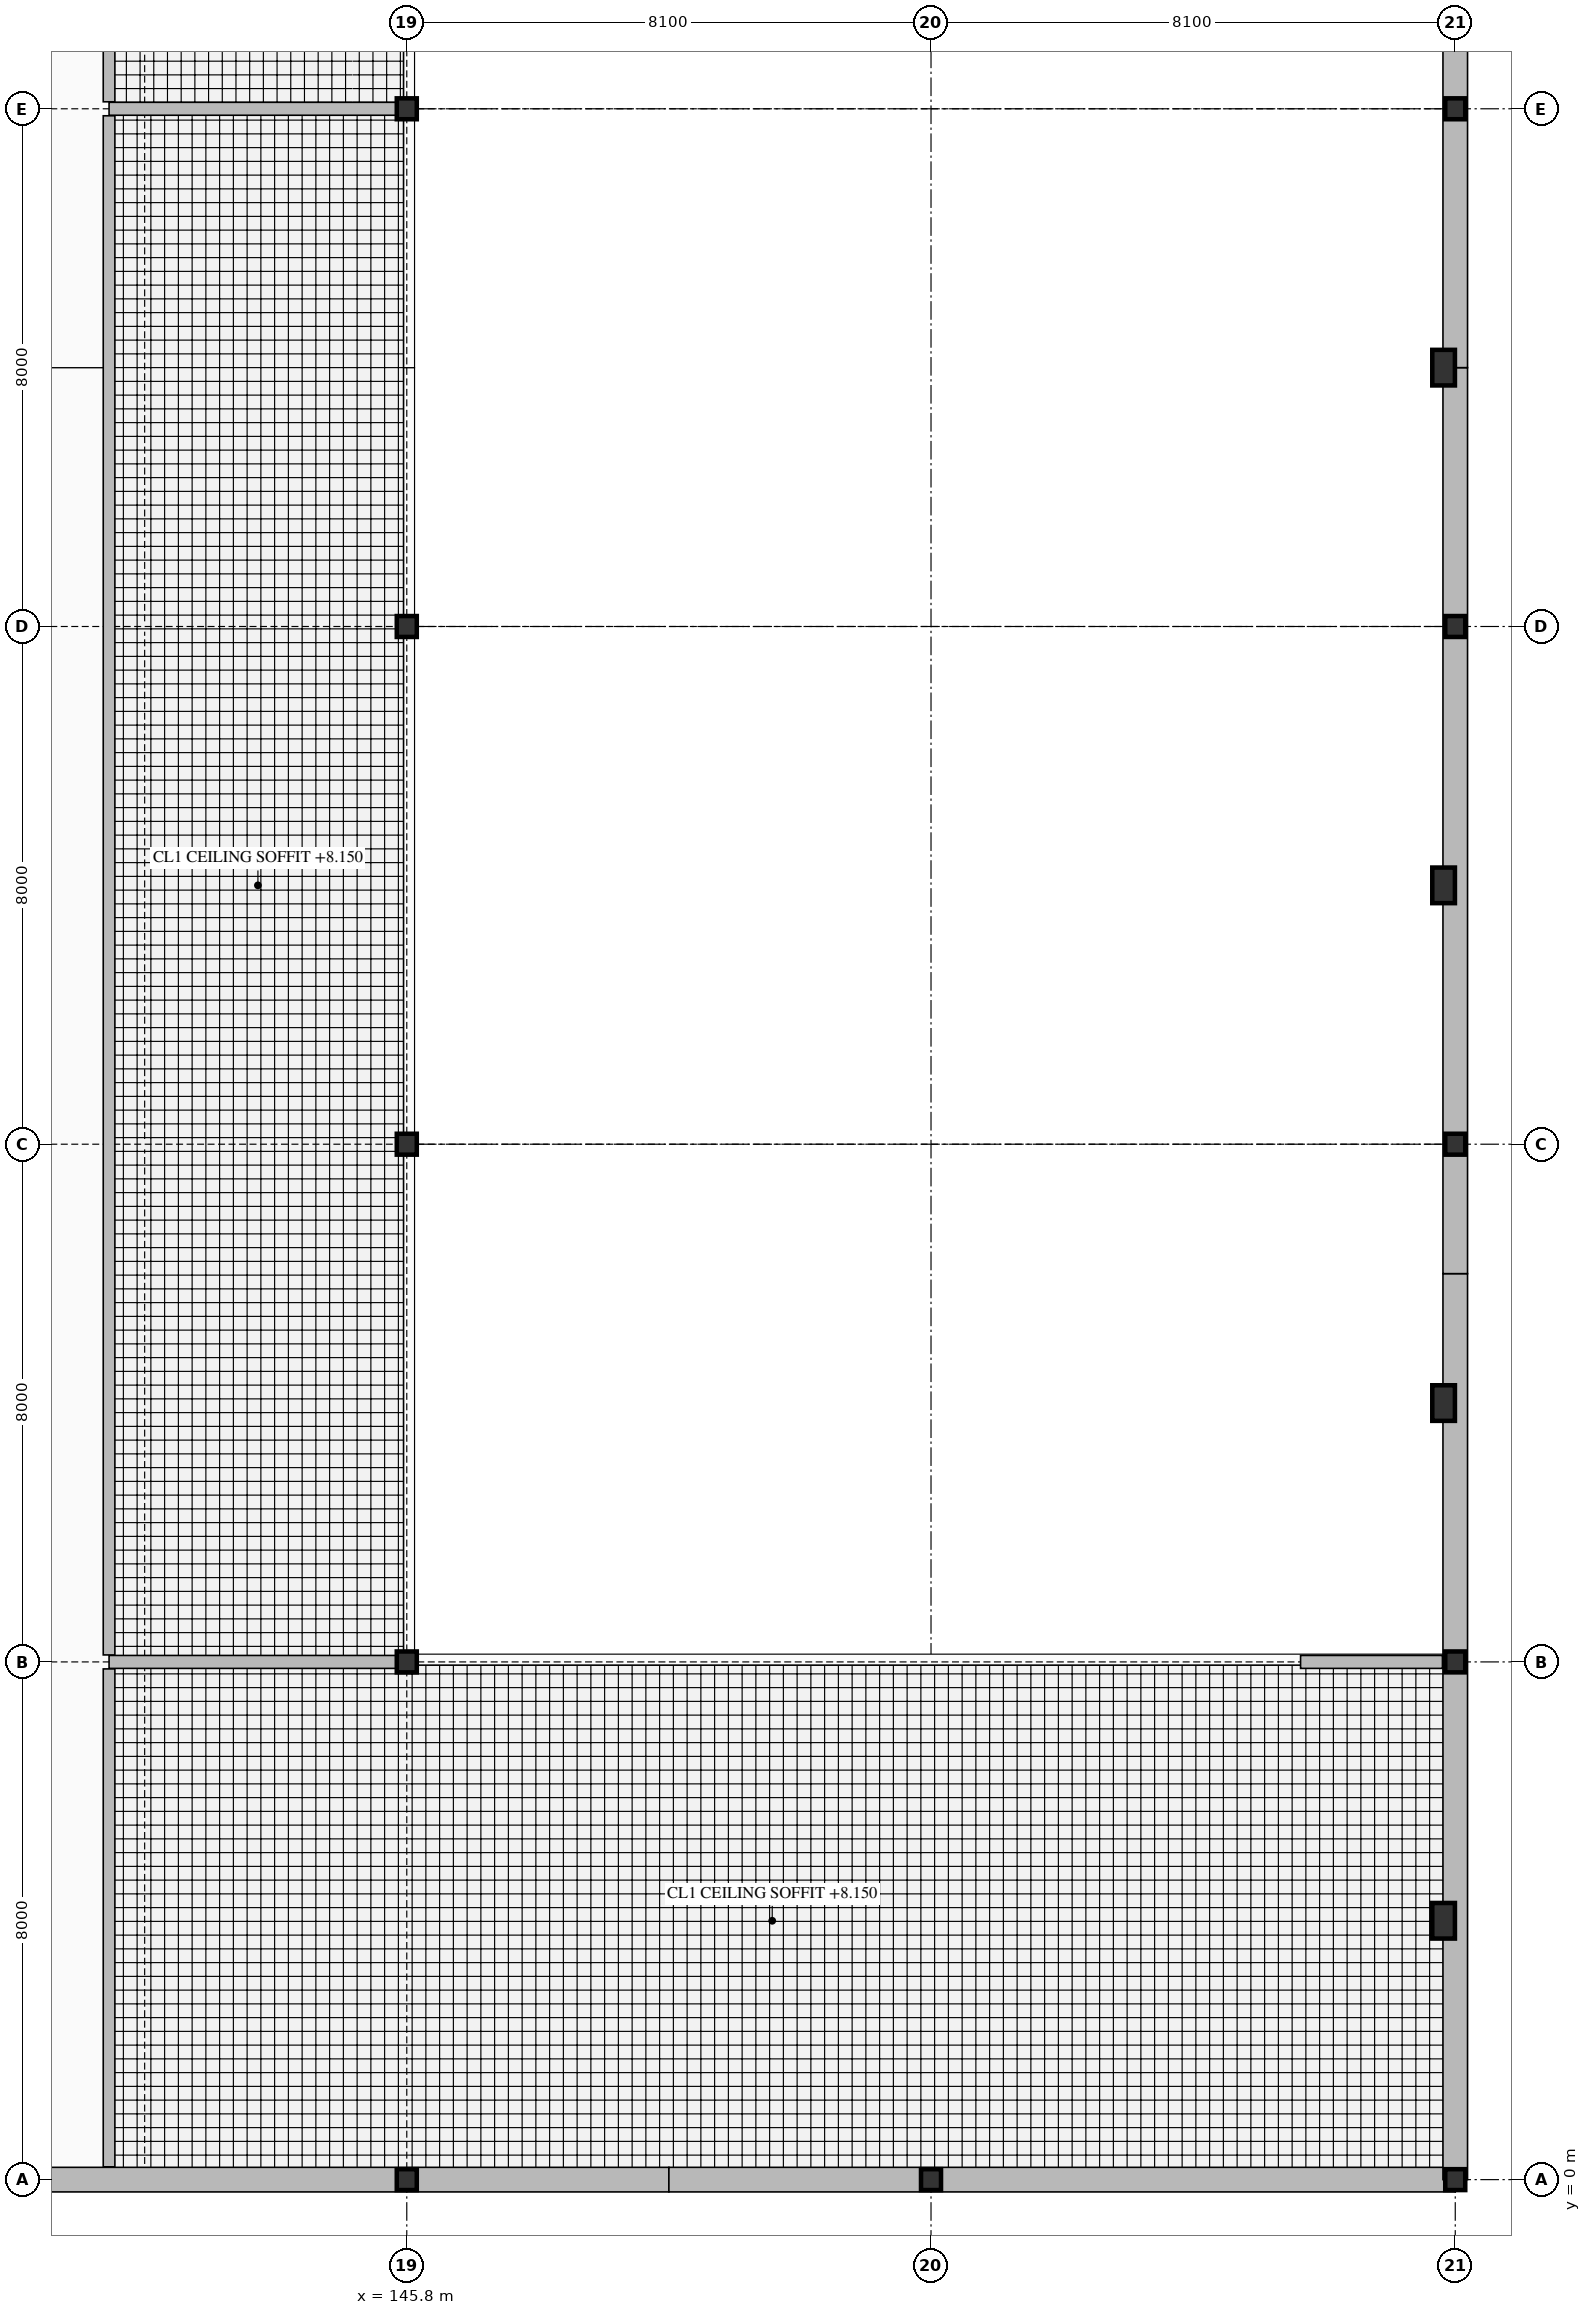
"""IFC4 building model, lengths in metres.
Left out: names, types, materials, properties, quantities, classifications, styles, units other than length and angle.
Written with IfcOpenShell. Run it as: python <this file> out.ifc"""

import sys

from ifc_helpers import new_model, si_unit, direction, frame, frame_2d, origin, origin_2d, place, context, subcontext, project, spatial, rectangle, i_section, extrude, element, fill, save


model = new_model("IFC4")
c1 = context("Model", 3, precision=1e-05, world=origin(), true_north=direction((0.0, 1.0)))
c2 = subcontext(c1, "Body", "Model", "MODEL_VIEW")
j1 = project(units=[si_unit("LENGTHUNIT", "METRE"), si_unit("PLANEANGLEUNIT", "RADIAN")], contexts=[c1])
p1 = place(None, origin())
s1 = spatial("IfcSite", under=j1, at=p1, CompositionType="ELEMENT")
p2 = place(p1, origin())
s2 = spatial("IfcBuilding", under=s1, at=p2, CompositionType="ELEMENT")
p3 = place(p2, frame((0.0, 0.0, 5.4)))
s3 = spatial("IfcBuildingStorey", under=s2, at=p3, CompositionType="ELEMENT", Elevation=5.4)
for number, where, z_axis, x_axis in (
    (1, (145.8, 0.0, 0.0), (0.0, 0.0, 1.0), (1.0, 0.0, 0.0)),
    (2, (145.8, 8.0, 0.0), (0.0, 0.0, 1.0), (1.0, 0.0, 0.0)),
    (3, (145.8, 16.0, 0.0), (0.0, 0.0, 1.0), (1.0, 0.0, 0.0)),
    (4, (145.8, 24.0, 0.0), (0.0, 0.0, 1.0), (1.0, 0.0, 0.0)),
    (5, (145.8, 32.0, 0.0), (0.0, 0.0, 1.0), (1.0, 0.0, 0.0)),
    (6, (153.9, 0.0, 0.0), (0.0, 0.0, 1.0), (1.0, 0.0, 0.0)),
    (7, (162.0, 0.0, 0.0), (0.0, 0.0, 1.0), (1.0, 0.0, 0.0)),
    (8, (162.0, 8.0, 0.0), (0.0, 0.0, 1.0), (1.0, 0.0, 0.0)),
    (9, (162.0, 16.0, 0.0), (0.0, 0.0, 1.0), (1.0, 0.0, 0.0)),
    (10, (162.0, 24.0, 0.0), (0.0, 0.0, 1.0), (1.0, 0.0, 0.0)),
    (11, (162.0, 32.0, 0.0), (0.0, 0.0, 1.0), (1.0, 0.0, 0.0)),
):
    element("IfcColumn", number, at=place(p3, frame(where, z_axis=z_axis, x_axis=x_axis)), inside=s3, PredefinedType="COLUMN", context=c2, shape_type="SweptSolid", body=[
        extrude(i_section(OverallWidth=0.309, OverallDepth=0.323, WebThickness=0.014, FlangeThickness=0.023, FilletRadius=0.015, at=origin_2d()), origin(), (0.0, 0.0, 1.0), 4.8),
    ])
for number, where, z_axis, x_axis in (
    (12, (161.82, 4.0, 0.0), (0.0, 0.0, 1.0), (1.0, 0.0, 0.0)),
    (13, (161.82, 12.0, 0.0), (0.0, 0.0, 1.0), (1.0, 0.0, 0.0)),
    (14, (161.82, 20.0, 0.0), (0.0, 0.0, 1.0), (1.0, 0.0, 0.0)),
    (15, (161.82, 28.0, 0.0), (0.0, 0.0, 1.0), (1.0, 0.0, 0.0)),
):
    element("IfcColumn", number, at=place(p3, frame(where, z_axis=z_axis, x_axis=x_axis)), inside=s3, PredefinedType="PILASTER", context=c2, shape_type="SweptSolid", body=[
        extrude(rectangle(XDim=0.35, YDim=0.55, at=origin_2d()), origin(), (0.0, 0.0, 1.0), 4.52),
    ])
p4 = place(p3, frame((137.7, 0.0, 0.0), z_axis=(0.0, 0.0, 1.0), x_axis=(1.0, 0.0, 0.0)))
e16 = element("IfcWall", 16, at=p4, inside=s3, PredefinedType="SOLIDWALL", context=c2, shape_type="SweptSolid", body=[
    extrude(rectangle(XDim=12.15, YDim=0.38, at=frame_2d((6.075, 0.0))), origin(), (0.0, 0.0, 1.0), 3.812),
])
p5 = place(p3, frame((149.85, 0.0, 0.0), z_axis=(0.0, 0.0, 1.0), x_axis=(1.0, 0.0, 0.0)))
e17 = element("IfcWall", 17, at=p5, inside=s3, PredefinedType="SOLIDWALL", context=c2, shape_type="SweptSolid", body=[
    extrude(rectangle(XDim=12.15, YDim=0.38, at=frame_2d((6.075, 0.0))), origin(), (0.0, 0.0, 1.0), 3.812),
])
for number, where, z_axis, x_axis in (
    (18, (162.0, 0.0, 0.0), (0.0, 0.0, 1.0), (0.0, 1.0, 0.0)),
    (19, (162.0, 14.0, 0.0), (0.0, 0.0, 1.0), (0.0, 1.0, 0.0)),
    (20, (162.0, 28.0, 0.0), (0.0, 0.0, 1.0), (0.0, 1.0, 0.0)),
):
    element("IfcWall", number, at=place(p3, frame(where, z_axis=z_axis, x_axis=x_axis)), inside=s3, PredefinedType="SOLIDWALL", context=c2, shape_type="SweptSolid", body=[
        extrude(rectangle(XDim=14.0, YDim=0.38, at=frame_2d((7.0, 0.0))), origin(), (0.0, 0.0, 1.0), 3.912),
    ])
for number, where, z_axis, x_axis in (
    (21, (141.2, 8.0, 0.0), (0.0, 0.0, 1.0), (1.0, 0.0, 0.0)),
    (22, (141.2, 32.0, 0.0), (0.0, 0.0, 1.0), (1.0, 0.0, 0.0)),
):
    element("IfcWall", number, at=place(p3, frame(where, z_axis=z_axis, x_axis=x_axis)), inside=s3, PredefinedType="PARTITIONING", context=c2, shape_type="SweptSolid", body=[
        extrude(rectangle(XDim=4.431, YDim=0.2, at=frame_2d((2.215, 0.0))), origin(), (0.0, 0.0, 1.0), 3.812),
    ])
p6 = place(p3, frame((159.61, 8.0, 0.0), z_axis=(0.0, 0.0, 1.0), x_axis=(1.0, 0.0, 0.0)))
e23 = element("IfcWall", 23, at=p6, inside=s3, PredefinedType="PARTITIONING", context=c2, shape_type="SweptSolid", body=[
    extrude(rectangle(XDim=2.192, YDim=0.2, at=frame_2d((1.096, 0.0))), origin(), (0.0, 0.0, 1.0), 3.312),
])
p7 = place(p3, frame((141.2, 0.198, 0.0), z_axis=(0.0, 0.0, 1.0), x_axis=(0.0, 1.0, 0.0)))
e24 = element("IfcWall", 24, at=p7, inside=s3, PredefinedType="PARTITIONING", context=c2, shape_type="SweptSolid", body=[
    extrude(rectangle(XDim=7.694, YDim=0.18, at=frame_2d((3.847, 0.0))), origin(), (0.0, 0.0, 1.0), 4.52),
])
p8 = place(p7, frame((3.297, 0.0, 0.0)))
e25 = element("IfcOpeningElement", 25, at=p8, cuts=e24, PredefinedType="OPENING", context=c2, shape_type="SweptSolid", body=[
    extrude(rectangle(XDim=1.1, YDim=2.2, at=frame_2d((0.55, 1.1))), frame((0.0, 0.1, 0.0), z_axis=(0.0, -1.0, 0.0), x_axis=(1.0, 0.0, 0.0)), (0.0, 0.0, 1.0), 0.2),
])
p9 = place(p3, frame((141.2, 8.108, 0.0), z_axis=(0.0, 0.0, 1.0), x_axis=(0.0, 1.0, 0.0)))
e26 = element("IfcWall", 26, at=p9, inside=s3, PredefinedType="PARTITIONING", context=c2, shape_type="SweptSolid", body=[
    extrude(rectangle(XDim=23.784, YDim=0.18, at=frame_2d((11.892, 0.0))), origin(), (0.0, 0.0, 1.0), 4.52),
])
p10 = place(p9, frame((11.142, 0.0, 0.0)))
e27 = element("IfcOpeningElement", 27, at=p10, cuts=e26, PredefinedType="OPENING", context=c2, shape_type="SweptSolid", body=[
    extrude(rectangle(XDim=1.5, YDim=2.3, at=frame_2d((0.75, 1.15))), frame((0.0, 0.1, 0.0), z_axis=(0.0, -1.0, 0.0), x_axis=(1.0, 0.0, 0.0)), (0.0, 0.0, 1.0), 0.2),
])
p11 = place(p3, frame((141.2, 32.108, 0.0), z_axis=(0.0, 0.0, 1.0), x_axis=(0.0, 1.0, 0.0)))
e28 = element("IfcWall", 28, at=p11, inside=s3, PredefinedType="PARTITIONING", context=c2, shape_type="SweptSolid", body=[
    extrude(rectangle(XDim=15.804, YDim=0.18, at=frame_2d((7.902, 0.0))), origin(), (0.0, 0.0, 1.0), 4.52),
])
p12 = place(p11, frame((7.402, 0.0, 0.0)))
e29 = element("IfcOpeningElement", 29, at=p12, cuts=e28, PredefinedType="OPENING", context=c2, shape_type="SweptSolid", body=[
    extrude(rectangle(XDim=1.0, YDim=2.2, at=frame_2d((0.5, 1.1))), frame((0.0, 0.1, 0.0), z_axis=(0.0, -1.0, 0.0), x_axis=(1.0, 0.0, 0.0)), (0.0, 0.0, 1.0), 0.2),
])
p13 = place(p8, frame((1.1, 0.0, 0.0), z_axis=(0.0, 0.0, 1.0), x_axis=(-1.0, 0.0, 0.0)))
e30 = element("IfcDoor", 30, at=p13, inside=s3, OperationType="SINGLE_SWING_RIGHT", PredefinedType="DOOR", context=c2, shape_type="SweptSolid", body=[
    extrude(rectangle(XDim=1.1, YDim=2.2, at=frame_2d((0.55, 1.1))), frame((0.0, 0.025, 0.0), z_axis=(0.0, -1.0, 0.0), x_axis=(1.0, 0.0, 0.0)), (0.0, 0.0, 1.0), 0.05),
])
fill(e25, e30)
p14 = place(p10, frame((1.5, 0.0, 0.0), z_axis=(0.0, 0.0, 1.0), x_axis=(-1.0, 0.0, 0.0)))
e31 = element("IfcDoor", 31, at=p14, inside=s3, OperationType="DOUBLE_DOOR_SINGLE_SWING", PredefinedType="DOOR", context=c2, shape_type="SweptSolid", body=[
    extrude(rectangle(XDim=1.5, YDim=2.3, at=frame_2d((0.75, 1.15))), frame((0.0, 0.025, 0.0), z_axis=(0.0, -1.0, 0.0), x_axis=(1.0, 0.0, 0.0)), (0.0, 0.0, 1.0), 0.05),
])
fill(e27, e31)
save(model, sys.argv[1])
